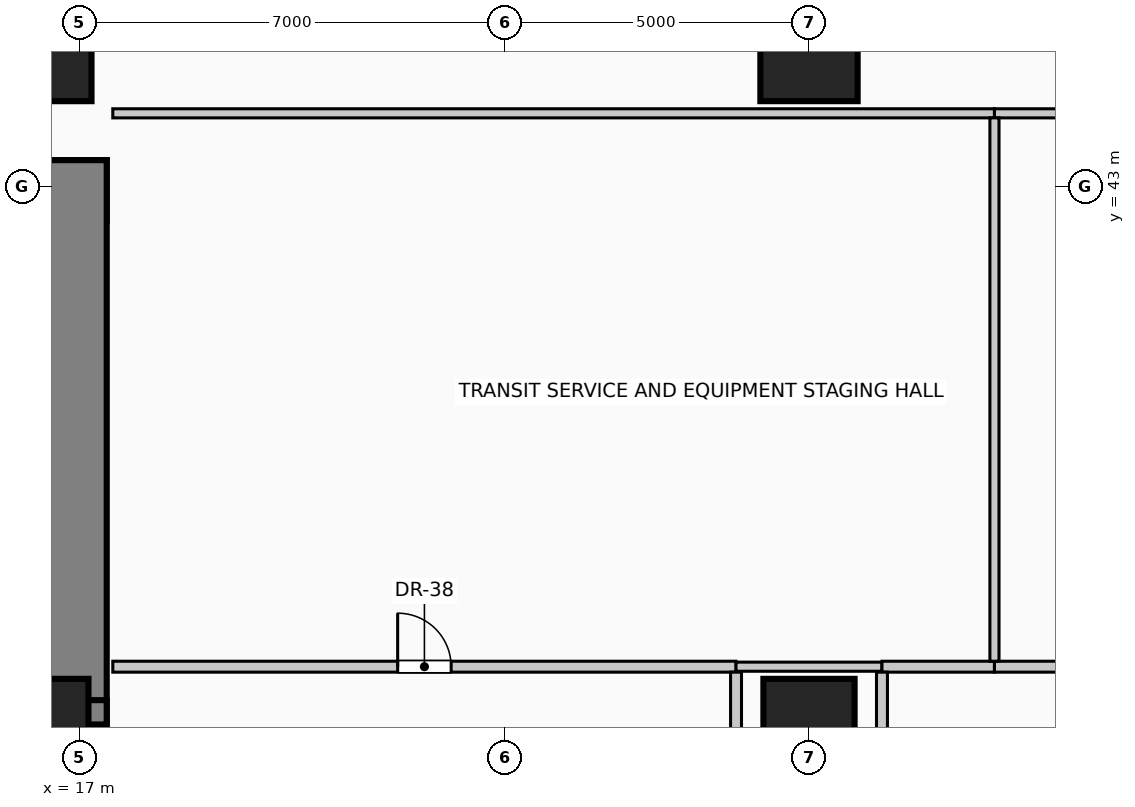
"""IFC4 building model, lengths in metres.
Left out: names, types, materials, properties, quantities, classifications, styles, units other than length and angle.
Written with IfcOpenShell. Run it as: python <this file> out.ifc"""

import sys

from ifc_helpers import new_model, si_unit, direction, frame, frame_2d, origin, origin_2d, place, context, subcontext, project, spatial, rectangle, extrude, element, fill, save


model = new_model("IFC4")
c1 = context("Model", 3, precision=1e-05, world=origin(), true_north=direction((0.0, 1.0)))
c2 = subcontext(c1, "Body", "Model", "MODEL_VIEW")
j1 = project(units=[si_unit("LENGTHUNIT", "METRE"), si_unit("PLANEANGLEUNIT", "RADIAN")], contexts=[c1])
p1 = place(None, origin())
s1 = spatial("IfcSite", under=j1, at=p1, CompositionType="ELEMENT")
p2 = place(p1, origin())
s2 = spatial("IfcBuilding", under=s1, at=p2, CompositionType="ELEMENT")
p3 = place(p2, frame((0.0, 0.0, -4.5)))
s3 = spatial("IfcBuildingStorey", under=s2, at=p3, CompositionType="ELEMENT", Elevation=-4.5)
p4 = place(p3, frame((2.55, 42.93, 0.0), z_axis=(0.0, 0.0, 1.0), x_axis=(1.0, 0.0, 0.0)))
e1 = element("IfcWall", 1, at=p4, inside=s3, PredefinedType="SHEAR", context=c2, shape_type="SweptSolid", body=[
    extrude(rectangle(XDim=14.9, YDim=1.0, at=frame_2d((7.45, 0.0))), origin(), (0.0, 0.0, 1.0), 4.5),
])
p5 = place(p3, frame((16.95, 34.15, 0.0), z_axis=(0.0, 0.0, 1.0), x_axis=(0.0, 1.0, 0.0)))
e2 = element("IfcWall", 2, at=p5, inside=s3, PredefinedType="SHEAR", context=c2, shape_type="SweptSolid", body=[
    extrude(rectangle(XDim=9.28, YDim=1.0, at=frame_2d((4.64, 0.0))), origin(), (0.0, 0.0, 1.0), 4.5),
])
p6 = place(p3, frame((12.29, 34.35, 0.0), z_axis=(0.0, 0.0, 1.0), x_axis=(1.0, 0.0, 0.0)))
e3 = element("IfcWall", 3, at=p6, inside=s3, PredefinedType="SHEAR", context=c2, shape_type="SweptSolid", body=[
    extrude(rectangle(XDim=5.16, YDim=0.4, at=frame_2d((2.58, 0.0))), origin(), (0.0, 0.0, 1.0), 4.5),
])
p7 = place(p6, frame((1.4, 0.0, 0.0)))
e4 = element("IfcOpeningElement", 4, at=p7, cuts=e3, PredefinedType="OPENING", context=c2, shape_type="SweptSolid", body=[
    extrude(rectangle(XDim=1.15, YDim=2.2, at=frame_2d((0.575, 1.1))), frame((0.0, 0.21, 0.0), z_axis=(0.0, -1.0, 0.0), x_axis=(1.0, 0.0, 0.0)), (0.0, 0.0, 1.0), 0.42),
])
for number, where, z_axis, x_axis in (
    (5, (16.4, 45.4, 0.0), (0.0, 0.0, 1.0), (1.0, 0.0, 0.0)),
    (6, (29.0, 45.4, 0.0), (0.0, 0.0, 1.0), (1.0, 0.0, 0.0)),
):
    element("IfcColumn", number, at=place(p3, frame(where, z_axis=z_axis, x_axis=x_axis)), inside=s3, PredefinedType="COLUMN", context=c2, shape_type="SweptSolid", body=[
        extrude(rectangle(XDim=1.6, YDim=2.0, at=origin_2d()), origin(), (0.0, 0.0, 1.0), 4.5),
    ])
for number, where, z_axis, x_axis in (
    (7, (16.4, 34.0, 0.0), (0.0, 0.0, 1.0), (1.0, 0.0, 0.0)),
    (8, (29.0, 34.0, 0.0), (0.0, 0.0, 1.0), (1.0, 0.0, 0.0)),
):
    element("IfcColumn", number, at=place(p3, frame(where, z_axis=z_axis, x_axis=x_axis)), inside=s3, PredefinedType="COLUMN", context=c2, shape_type="SweptSolid", body=[
        extrude(rectangle(XDim=1.5, YDim=1.8, at=origin_2d()), origin(), (0.0, 0.0, 1.0), 4.5),
    ])
p8 = place(p3, frame((17.55, 35.1, 0.0), z_axis=(0.0, 0.0, 1.0), x_axis=(1.0, 0.0, 0.0)))
e9 = element("IfcWall", 9, at=p8, inside=s3, PredefinedType="PARTITIONING", context=c2, shape_type="SweptSolid", body=[
    extrude(rectangle(XDim=10.25, YDim=0.18, at=frame_2d((5.125, 0.0))), origin(), (0.0, 0.0, 1.0), 4.1),
])
p9 = place(p8, frame((4.685, 0.0, 0.0)))
e10 = element("IfcOpeningElement", 10, at=p9, cuts=e9, PredefinedType="OPENING", context=c2, shape_type="SweptSolid", body=[
    extrude(rectangle(XDim=0.88, YDim=2.1, at=frame_2d((0.44, 1.05))), frame((0.0, 0.1, 0.0), z_axis=(0.0, -1.0, 0.0), x_axis=(1.0, 0.0, 0.0)), (0.0, 0.0, 1.0), 0.2),
])
p10 = place(p3, frame((27.8, 35.1, 0.0), z_axis=(0.0, 0.0, 1.0), x_axis=(1.0, 0.0, 0.0)))
e11 = element("IfcWall", 11, at=p10, inside=s3, PredefinedType="PARTITIONING", context=c2, shape_type="SweptSolid", body=[
    extrude(rectangle(XDim=2.4, YDim=0.15, at=frame_2d((1.2, 0.0))), origin(), (0.0, 0.0, 1.0), 4.1),
])
p11 = place(p3, frame((30.2, 35.1, 0.0), z_axis=(0.0, 0.0, 1.0), x_axis=(1.0, 0.0, 0.0)))
e12 = element("IfcWall", 12, at=p11, inside=s3, PredefinedType="PARTITIONING", context=c2, shape_type="SweptSolid", body=[
    extrude(rectangle(XDim=1.85, YDim=0.18, at=frame_2d((0.925, 0.0))), origin(), (0.0, 0.0, 1.0), 4.1),
])
p12 = place(p3, frame((32.05, 35.1, 0.0), z_axis=(0.0, 0.0, 1.0), x_axis=(1.0, 0.0, 0.0)))
e13 = element("IfcWall", 13, at=p12, inside=s3, PredefinedType="PARTITIONING", context=c2, shape_type="SweptSolid", body=[
    extrude(rectangle(XDim=8.35, YDim=0.18, at=frame_2d((4.175, 0.0))), origin(), (0.0, 0.0, 1.0), 4.1),
])
p13 = place(p12, frame((3.735, 0.0, 0.0)))
e14 = element("IfcOpeningElement", 14, at=p13, cuts=e13, PredefinedType="OPENING", context=c2, shape_type="SweptSolid", body=[
    extrude(rectangle(XDim=0.88, YDim=2.1, at=frame_2d((0.44, 1.05))), frame((0.0, 0.1, 0.0), z_axis=(0.0, -1.0, 0.0), x_axis=(1.0, 0.0, 0.0)), (0.0, 0.0, 1.0), 0.2),
])
p14 = place(p3, frame((17.55, 44.2, 0.0), z_axis=(0.0, 0.0, 1.0), x_axis=(1.0, 0.0, 0.0)))
e15 = element("IfcWall", 15, at=p14, inside=s3, PredefinedType="PARTITIONING", context=c2, shape_type="SweptSolid", body=[
    extrude(rectangle(XDim=14.5, YDim=0.15, at=frame_2d((7.25, 0.0))), origin(), (0.0, 0.0, 1.0), 4.1),
])
p15 = place(p3, frame((32.05, 44.2, 0.0), z_axis=(0.0, 0.0, 1.0), x_axis=(1.0, 0.0, 0.0)))
e16 = element("IfcWall", 16, at=p15, inside=s3, PredefinedType="PARTITIONING", context=c2, shape_type="SweptSolid", body=[
    extrude(rectangle(XDim=8.35, YDim=0.15, at=frame_2d((4.175, 0.0))), origin(), (0.0, 0.0, 1.0), 4.1),
])
for number, where, z_axis, x_axis in (
    (17, (27.8, 32.44, 0.0), (0.0, 0.0, 1.0), (0.0, 1.0, 0.0)),
    (18, (30.2, 32.44, 0.0), (0.0, 0.0, 1.0), (0.0, 1.0, 0.0)),
):
    element("IfcWall", number, at=place(p3, frame(where, z_axis=z_axis, x_axis=x_axis)), inside=s3, PredefinedType="PARTITIONING", context=c2, shape_type="SweptSolid", body=[
        extrude(rectangle(XDim=2.57, YDim=0.18, at=frame_2d((1.285, 0.0))), origin(), (0.0, 0.0, 1.0), 4.1),
    ])
p16 = place(p3, frame((32.05, 35.19, 0.0), z_axis=(0.0, 0.0, 1.0), x_axis=(0.0, 1.0, 0.0)))
e19 = element("IfcWall", 19, at=p16, inside=s3, PredefinedType="PARTITIONING", context=c2, shape_type="SweptSolid", body=[
    extrude(rectangle(XDim=8.935, YDim=0.15, at=frame_2d((4.468, 0.0))), origin(), (0.0, 0.0, 1.0), 4.1),
])
p17 = place(p9, origin())
e20 = element("IfcDoor", 20, at=p17, inside=s3, OperationType="SINGLE_SWING_LEFT", PredefinedType="DOOR", context=c2, shape_type="SweptSolid", body=[
    extrude(rectangle(XDim=0.88, YDim=2.1, at=frame_2d((0.44, 1.05))), frame((0.0, 0.025, 0.0), z_axis=(0.0, -1.0, 0.0), x_axis=(1.0, 0.0, 0.0)), (0.0, 0.0, 1.0), 0.05),
])
fill(e10, e20)
save(model, sys.argv[1])
